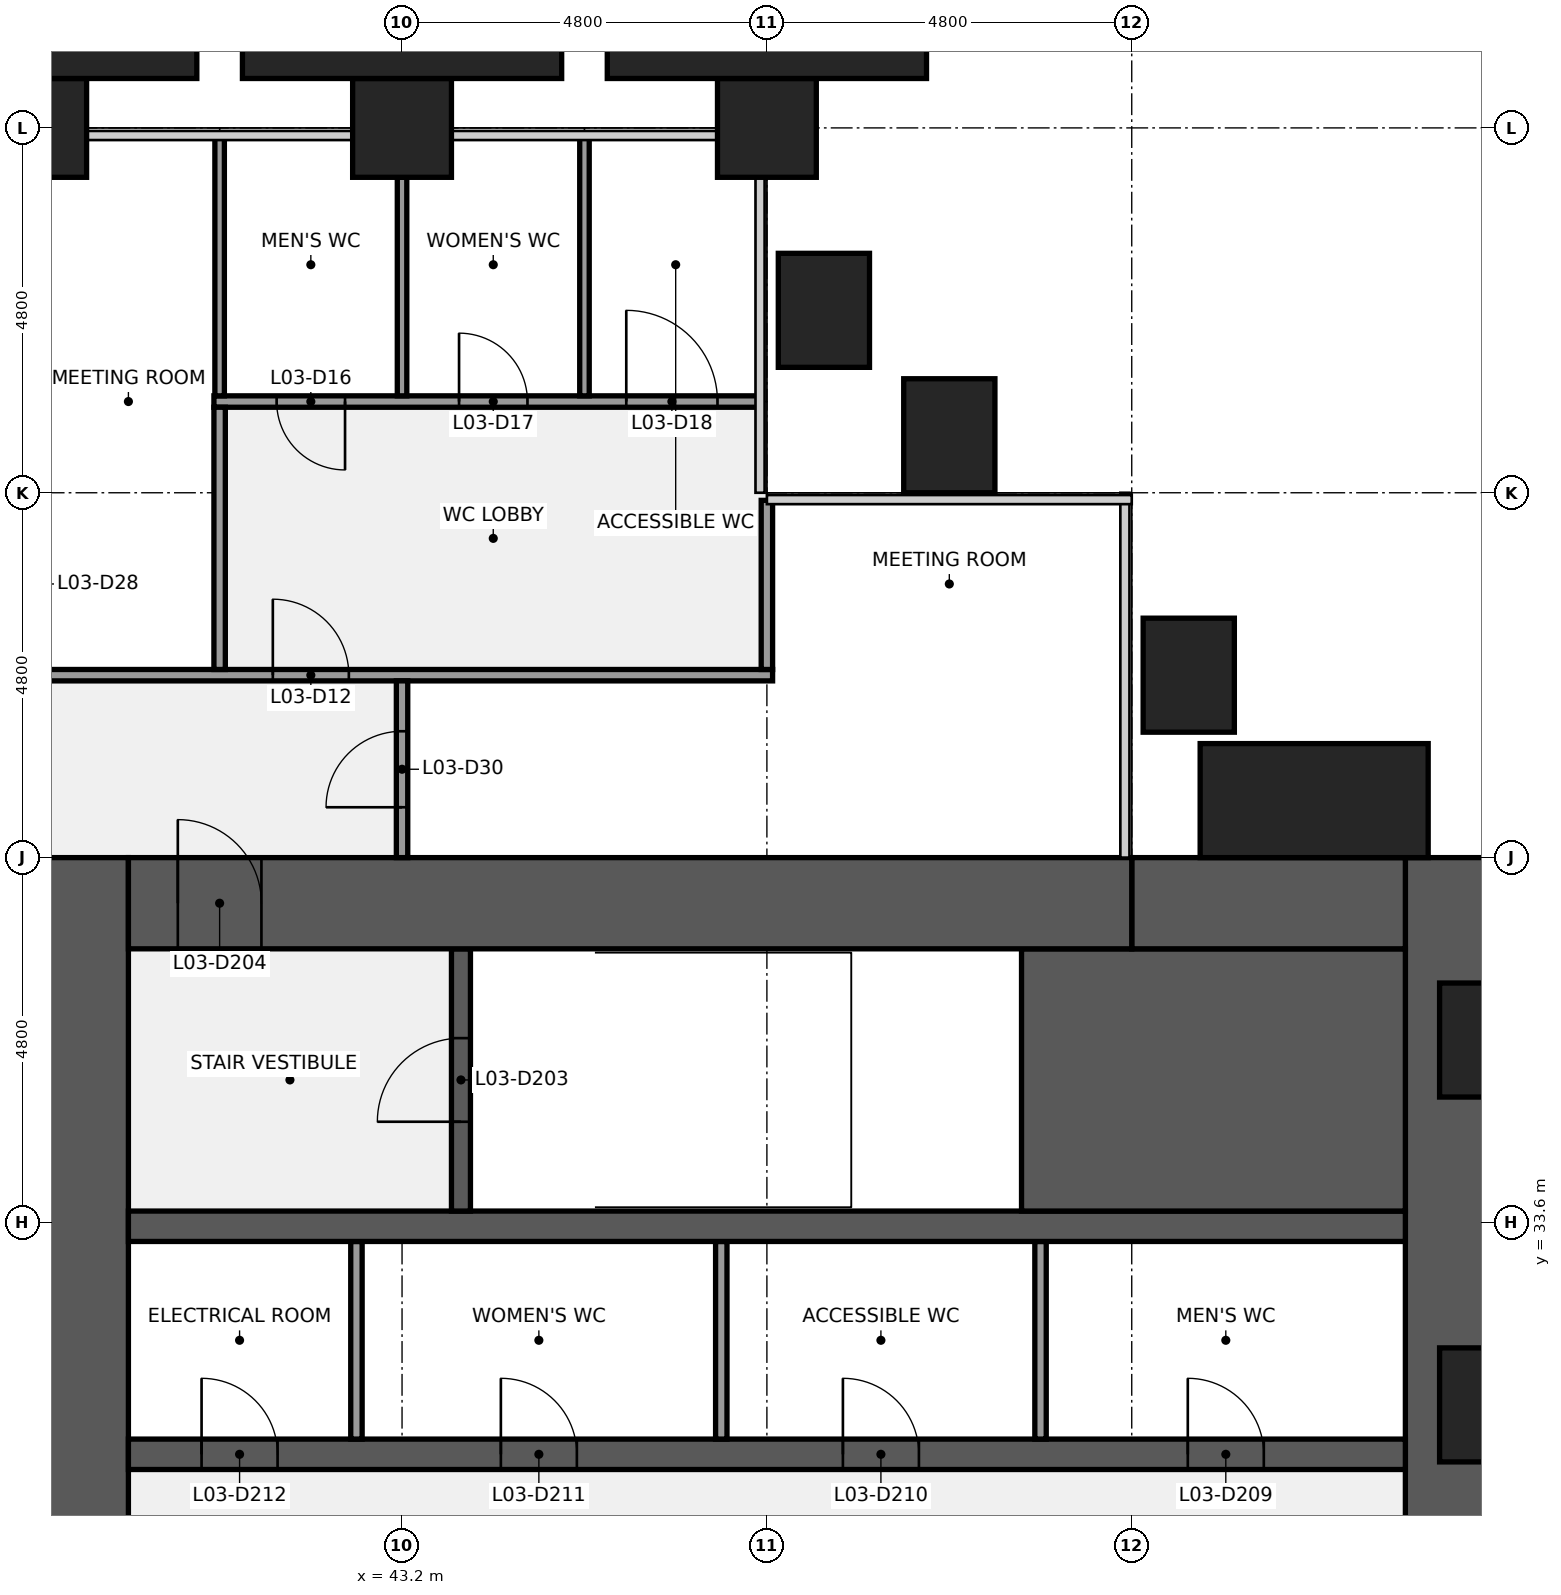
"""IFC4 building model, lengths in metres.
Left out: names, types, materials, properties, quantities, classifications, styles, units other than length and angle.
Written with IfcOpenShell. Run it as: python <this file> out.ifc"""

import sys

from ifc_helpers import new_model, si_unit, direction, frame, frame_2d, origin, origin_2d, place, context, subcontext, project, spatial, rectangle, extrude, element, fill, save


model = new_model("IFC4")
c1 = context("Model", 3, precision=1e-05, world=origin(), true_north=direction((0.0, 1.0)))
c2 = subcontext(c1, "Body", "Model", "MODEL_VIEW")
j1 = project(units=[si_unit("LENGTHUNIT", "METRE"), si_unit("PLANEANGLEUNIT", "RADIAN")], contexts=[c1])
p1 = place(None, origin())
s1 = spatial("IfcSite", under=j1, at=p1, CompositionType="ELEMENT")
p2 = place(p1, origin())
s2 = spatial("IfcBuilding", under=s1, at=p2, CompositionType="ELEMENT")
p3 = place(p2, frame((0.0, 0.0, 21.4)))
s3 = spatial("IfcBuildingStorey", under=s2, at=p3, CompositionType="ELEMENT", Elevation=21.4)
for number, where, z_axis, x_axis in (
    (1, (38.4, 48.0, 0.0), (0.0, 0.0, 1.0), (1.0, 0.0, 0.0)),
    (2, (43.2, 48.0, 0.0), (0.0, 0.0, 1.0), (1.0, 0.0, 0.0)),
    (3, (48.0, 48.0, 0.0), (0.0, 0.0, 1.0), (1.0, 0.0, 0.0)),
):
    element("IfcColumn", number, at=place(p3, frame(where, z_axis=z_axis, x_axis=x_axis)), inside=s3, PredefinedType="COLUMN", context=c2, shape_type="SweptSolid", body=[
        extrude(rectangle(XDim=1.3, YDim=1.3, at=origin_2d()), origin(), (0.0, 0.0, 1.0), 4.4),
    ])
p4 = place(p3, frame((57.0, 38.4, 0.0), z_axis=(0.0, 0.0, 1.0), x_axis=(0.0, -1.0, 0.0)))
e4 = element("IfcWall", 4, at=p4, inside=s3, PredefinedType="SHEAR", context=c2, shape_type="SweptSolid", body=[
    extrude(rectangle(XDim=28.8, YDim=1.2, at=frame_2d((14.4, 0.0))), origin(), (0.0, 0.0, 1.0), 4.24),
])
p5 = place(p4, frame((18.45, 0.0, 0.9)))
e5 = element("IfcOpeningElement", 5, at=p5, cuts=e4, PredefinedType="OPENING", context=c2, shape_type="SweptSolid", body=[
    extrude(rectangle(XDim=1.5, YDim=1.5, at=frame_2d((0.75, 0.75))), frame((0.0, 0.61, 0.0), z_axis=(0.0, -1.0, 0.0), x_axis=(1.0, 0.0, 0.0)), (0.0, 0.0, 1.0), 1.22),
])
p6 = place(p4, frame((8.85, 0.0, 0.9)))
e6 = element("IfcOpeningElement", 6, at=p6, cuts=e4, PredefinedType="OPENING", context=c2, shape_type="SweptSolid", body=[
    extrude(rectangle(XDim=1.5, YDim=1.5, at=frame_2d((0.75, 0.75))), frame((0.0, 0.61, 0.0), z_axis=(0.0, -1.0, 0.0), x_axis=(1.0, 0.0, 0.0)), (0.0, 0.0, 1.0), 1.22),
])
p7 = place(p3, frame((39.0, 9.6, 0.0), z_axis=(0.0, 0.0, 1.0), x_axis=(0.0, 1.0, 0.0)))
e7 = element("IfcWall", 7, at=p7, inside=s3, PredefinedType="SHEAR", context=c2, shape_type="SweptSolid", body=[
    extrude(rectangle(XDim=28.8, YDim=1.2, at=frame_2d((14.4, 0.0))), origin(), (0.0, 0.0, 1.0), 4.24),
])
p8 = place(p7, frame((8.7, 0.0, 0.0)))
e8 = element("IfcOpeningElement", 8, at=p8, cuts=e7, PredefinedType="OPENING", context=c2, shape_type="SweptSolid", body=[
    extrude(rectangle(XDim=1.8, YDim=2.1, at=frame_2d((0.9, 1.05))), frame((0.0, 0.61, 0.0), z_axis=(0.0, -1.0, 0.0), x_axis=(1.0, 0.0, 0.0)), (0.0, 0.0, 1.0), 1.22),
])
p9 = place(p7, frame((18.3, 0.0, 0.0)))
e9 = element("IfcOpeningElement", 9, at=p9, cuts=e7, PredefinedType="OPENING", context=c2, shape_type="SweptSolid", body=[
    extrude(rectangle(XDim=1.8, YDim=2.1, at=frame_2d((0.9, 1.05))), frame((0.0, 0.61, 0.0), z_axis=(0.0, -1.0, 0.0), x_axis=(1.0, 0.0, 0.0)), (0.0, 0.0, 1.0), 1.22),
])
p10 = place(p3, frame((39.6, 30.55, 0.0), z_axis=(0.0, 0.0, 1.0), x_axis=(1.0, 0.0, 0.0)))
e10 = element("IfcWall", 10, at=p10, inside=s3, PredefinedType="SHEAR", context=c2, shape_type="SweptSolid", body=[
    extrude(rectangle(XDim=16.8, YDim=0.4, at=frame_2d((8.4, 0.0))), origin(), (0.0, 0.0, 1.0), 4.24),
])
p11 = place(p10, frame((13.938, 0.0, 0.0)))
e11 = element("IfcOpeningElement", 11, at=p11, cuts=e10, PredefinedType="OPENING", context=c2, shape_type="SweptSolid", body=[
    extrude(rectangle(XDim=1.0, YDim=2.1, at=frame_2d((0.5, 1.05))), frame((0.0, 0.21, 0.0), z_axis=(0.0, -1.0, 0.0), x_axis=(1.0, 0.0, 0.0)), (0.0, 0.0, 1.0), 0.42),
])
p12 = place(p10, frame((9.4, 0.0, 0.0)))
e12 = element("IfcOpeningElement", 12, at=p12, cuts=e10, PredefinedType="OPENING", context=c2, shape_type="SweptSolid", body=[
    extrude(rectangle(XDim=1.0, YDim=2.1, at=frame_2d((0.5, 1.05))), frame((0.0, 0.21, 0.0), z_axis=(0.0, -1.0, 0.0), x_axis=(1.0, 0.0, 0.0)), (0.0, 0.0, 1.0), 0.42),
])
p13 = place(p10, frame((4.9, 0.0, 0.0)))
e13 = element("IfcOpeningElement", 13, at=p13, cuts=e10, PredefinedType="OPENING", context=c2, shape_type="SweptSolid", body=[
    extrude(rectangle(XDim=1.0, YDim=2.1, at=frame_2d((0.5, 1.05))), frame((0.0, 0.21, 0.0), z_axis=(0.0, -1.0, 0.0), x_axis=(1.0, 0.0, 0.0)), (0.0, 0.0, 1.0), 0.42),
])
p14 = place(p10, frame((0.962, 0.0, 0.0)))
e14 = element("IfcOpeningElement", 14, at=p14, cuts=e10, PredefinedType="OPENING", context=c2, shape_type="SweptSolid", body=[
    extrude(rectangle(XDim=1.0, YDim=2.1, at=frame_2d((0.5, 1.05))), frame((0.0, 0.21, 0.0), z_axis=(0.0, -1.0, 0.0), x_axis=(1.0, 0.0, 0.0)), (0.0, 0.0, 1.0), 0.42),
])
for number, where, z_axis, x_axis in (
    (15, (51.6, 30.75, 0.0), (0.0, 0.0, 1.0), (0.0, 1.0, 0.0)),
    (16, (47.4, 30.75, 0.0), (0.0, 0.0, 1.0), (0.0, 1.0, 0.0)),
    (17, (42.6, 30.75, 0.0), (0.0, 0.0, 1.0), (0.0, 1.0, 0.0)),
):
    element("IfcWall", number, at=place(p3, frame(where, z_axis=z_axis, x_axis=x_axis)), inside=s3, PredefinedType="PARTITIONING", context=c2, shape_type="SweptSolid", body=[
        extrude(rectangle(XDim=2.6, YDim=0.15, at=frame_2d((1.3, 0.0))), origin(), (0.0, 0.0, 1.0), 4.24),
    ])
p15 = place(p3, frame((39.6, 33.55, 0.0), z_axis=(0.0, 0.0, 1.0), x_axis=(1.0, 0.0, 0.0)))
e18 = element("IfcWall", 18, at=p15, inside=s3, PredefinedType="SHEAR", context=c2, shape_type="SweptSolid", body=[
    extrude(rectangle(XDim=16.8, YDim=0.4, at=frame_2d((8.4, 0.0))), origin(), (0.0, 0.0, 1.0), 4.24),
])
p16 = place(p3, frame((51.35, 35.475, 0.0), z_axis=(0.0, 0.0, 1.0), x_axis=(1.0, 0.0, 0.0)))
e19 = element("IfcWall", 19, at=p16, inside=s3, PredefinedType="SHEAR", context=c2, shape_type="SweptSolid", body=[
    extrude(rectangle(XDim=5.05, YDim=3.45, at=frame_2d((2.525, 0.0))), origin(), (0.0, 0.0, 1.0), 4.24),
])
p17 = place(p3, frame((43.975, 33.75, 0.0), z_axis=(0.0, 0.0, 1.0), x_axis=(0.0, 1.0, 0.0)))
e20 = element("IfcWall", 20, at=p17, inside=s3, PredefinedType="SHEAR", context=c2, shape_type="SweptSolid", body=[
    extrude(rectangle(XDim=3.45, YDim=0.25, at=frame_2d((1.725, 0.0))), origin(), (0.0, 0.0, 1.0), 4.24),
])
p18 = place(p17, frame((1.175, 0.0, 0.0)))
e21 = element("IfcOpeningElement", 21, at=p18, cuts=e20, PredefinedType="OPENING", context=c2, shape_type="SweptSolid", body=[
    extrude(rectangle(XDim=1.1, YDim=2.1, at=frame_2d((0.55, 1.05))), frame((0.0, 0.135, 0.0), z_axis=(0.0, -1.0, 0.0), x_axis=(1.0, 0.0, 0.0)), (0.0, 0.0, 1.0), 0.27),
])
p19 = place(p3, frame((52.8, 37.8, 0.0), z_axis=(0.0, 0.0, 1.0), x_axis=(1.0, 0.0, 0.0)))
e22 = element("IfcWall", 22, at=p19, inside=s3, PredefinedType="SHEAR", context=c2, shape_type="SweptSolid", body=[
    extrude(rectangle(XDim=3.6, YDim=1.2, at=frame_2d((1.8, 0.0))), origin(), (0.0, 0.0, 1.0), 4.24),
])
p20 = place(p3, frame((39.6, 37.8, 0.0), z_axis=(0.0, 0.0, 1.0), x_axis=(1.0, 0.0, 0.0)))
e23 = element("IfcWall", 23, at=p20, inside=s3, PredefinedType="SHEAR", context=c2, shape_type="SweptSolid", body=[
    extrude(rectangle(XDim=13.2, YDim=1.2, at=frame_2d((6.6, 0.0))), origin(), (0.0, 0.0, 1.0), 4.24),
])
p21 = place(p20, frame((0.65, 0.0, 0.0)))
e24 = element("IfcOpeningElement", 24, at=p21, cuts=e23, PredefinedType="OPENING", context=c2, shape_type="SweptSolid", body=[
    extrude(rectangle(XDim=1.1, YDim=2.1, at=frame_2d((0.55, 1.05))), frame((0.0, 0.61, 0.0), z_axis=(0.0, -1.0, 0.0), x_axis=(1.0, 0.0, 0.0)), (0.0, 0.0, 1.0), 1.22),
])
p22 = place(p3, frame((38.325, 40.8, 0.0), z_axis=(0.0, 0.0, 1.0), x_axis=(1.0, 0.0, 0.0)))
e25 = element("IfcWall", 25, at=p22, inside=s3, PredefinedType="PARTITIONING", context=c2, shape_type="SweptSolid", body=[
    extrude(rectangle(XDim=9.75, YDim=0.15, at=frame_2d((4.875, 0.0))), origin(), (0.0, 0.0, 1.0), 3.27),
])
p23 = place(p22, frame((3.175, 0.0, 0.0)))
e26 = element("IfcOpeningElement", 26, at=p23, cuts=e25, PredefinedType="OPENING", context=c2, shape_type="SweptSolid", body=[
    extrude(rectangle(XDim=1.0, YDim=2.1, at=frame_2d((0.5, 1.05))), frame((0.0, 0.085, 0.0), z_axis=(0.0, -1.0, 0.0), x_axis=(1.0, 0.0, 0.0)), (0.0, 0.0, 1.0), 0.17),
])
p24 = place(p3, frame((40.725, 44.4, 0.0), z_axis=(0.0, 0.0, 1.0), x_axis=(1.0, 0.0, 0.0)))
e27 = element("IfcWall", 27, at=p24, inside=s3, PredefinedType="PARTITIONING", context=c2, shape_type="SweptSolid", body=[
    extrude(rectangle(XDim=7.175, YDim=0.15, at=frame_2d((3.587, 0.0))), origin(), (0.0, 0.0, 1.0), 3.27),
])
p25 = place(p24, frame((0.825, 0.0, 0.0)))
e28 = element("IfcOpeningElement", 28, at=p25, cuts=e27, PredefinedType="OPENING", context=c2, shape_type="SweptSolid", body=[
    extrude(rectangle(XDim=0.9, YDim=2.1, at=frame_2d((0.45, 1.05))), frame((0.0, 0.085, 0.0), z_axis=(0.0, -1.0, 0.0), x_axis=(1.0, 0.0, 0.0)), (0.0, 0.0, 1.0), 0.17),
])
p26 = place(p24, frame((3.225, 0.0, 0.0)))
e29 = element("IfcOpeningElement", 29, at=p26, cuts=e27, PredefinedType="OPENING", context=c2, shape_type="SweptSolid", body=[
    extrude(rectangle(XDim=0.9, YDim=2.1, at=frame_2d((0.45, 1.05))), frame((0.0, 0.085, 0.0), z_axis=(0.0, -1.0, 0.0), x_axis=(1.0, 0.0, 0.0)), (0.0, 0.0, 1.0), 0.17),
])
p27 = place(p24, frame((5.425, 0.0, 0.0)))
e30 = element("IfcOpeningElement", 30, at=p27, cuts=e27, PredefinedType="OPENING", context=c2, shape_type="SweptSolid", body=[
    extrude(rectangle(XDim=1.2, YDim=2.1, at=frame_2d((0.6, 1.05))), frame((0.0, 0.085, 0.0), z_axis=(0.0, -1.0, 0.0), x_axis=(1.0, 0.0, 0.0)), (0.0, 0.0, 1.0), 0.17),
])
p28 = place(p3, frame((40.8, 44.475, 0.0), z_axis=(0.0, 0.0, 1.0), x_axis=(0.0, 1.0, 0.0)))
e31 = element("IfcWall", 31, at=p28, inside=s3, PredefinedType="PARTITIONING", context=c2, shape_type="SweptSolid", body=[
    extrude(rectangle(XDim=3.425, YDim=0.125, at=frame_2d((1.712, 0.0))), origin(), (0.0, 0.0, 1.0), 3.27),
])
p29 = place(p3, frame((40.8, 40.875, 0.0), z_axis=(0.0, 0.0, 1.0), x_axis=(0.0, 1.0, 0.0)))
e32 = element("IfcWall", 32, at=p29, inside=s3, PredefinedType="PARTITIONING", context=c2, shape_type="SweptSolid", body=[
    extrude(rectangle(XDim=3.45, YDim=0.15, at=frame_2d((1.725, 0.0))), origin(), (0.0, 0.0, 1.0), 3.27),
])
p30 = place(p3, frame((43.2, 44.475, 0.0), z_axis=(0.0, 0.0, 1.0), x_axis=(0.0, 1.0, 0.0)))
e33 = element("IfcWall", 33, at=p30, inside=s3, PredefinedType="PARTITIONING", context=c2, shape_type="SweptSolid", body=[
    extrude(rectangle(XDim=2.875, YDim=0.125, at=frame_2d((1.438, 0.0))), origin(), (0.0, 0.0, 1.0), 3.27),
])
p31 = place(p3, frame((43.2, 38.4, 0.0), z_axis=(0.0, 0.0, 1.0), x_axis=(0.0, 1.0, 0.0)))
e34 = element("IfcWall", 34, at=p31, inside=s3, PredefinedType="PARTITIONING", context=c2, shape_type="SweptSolid", body=[
    extrude(rectangle(XDim=2.325, YDim=0.15, at=frame_2d((1.163, 0.0))), origin(), (0.0, 0.0, 1.0), 3.27),
])
p32 = place(p31, frame((0.663, 0.0, 0.0)))
e35 = element("IfcOpeningElement", 35, at=p32, cuts=e34, PredefinedType="OPENING", context=c2, shape_type="SweptSolid", body=[
    extrude(rectangle(XDim=1.0, YDim=2.1, at=frame_2d((0.5, 1.05))), frame((0.0, 0.085, 0.0), z_axis=(0.0, -1.0, 0.0), x_axis=(1.0, 0.0, 0.0)), (0.0, 0.0, 1.0), 0.17),
])
p33 = place(p3, frame((45.6, 44.475, 0.0), z_axis=(0.0, 0.0, 1.0), x_axis=(0.0, 1.0, 0.0)))
e36 = element("IfcWall", 36, at=p33, inside=s3, PredefinedType="PARTITIONING", context=c2, shape_type="SweptSolid", body=[
    extrude(rectangle(XDim=3.425, YDim=0.125, at=frame_2d((1.712, 0.0))), origin(), (0.0, 0.0, 1.0), 3.27),
])
p34 = place(p3, frame((48.0, 40.875, 0.0), z_axis=(0.0, 0.0, 1.0), x_axis=(0.0, 1.0, 0.0)))
e37 = element("IfcWall", 37, at=p34, inside=s3, PredefinedType="PARTITIONING", context=c2, shape_type="SweptSolid", body=[
    extrude(rectangle(XDim=2.225, YDim=0.15, at=frame_2d((1.113, 0.0))), origin(), (0.0, 0.0, 1.0), 3.27),
])
for number, where, z_axis, x_axis in (
    (38, (53.55, 40.8, 0.0), (0.0, 0.0, 1.0), (0.0, 1.0, 0.0)),
    (39, (50.4, 43.95, 0.0), (0.0, 0.0, 1.0), (1.0, 0.0, 0.0)),
    (40, (48.75, 45.6, 0.0), (0.0, 0.0, 1.0), (0.0, 1.0, 0.0)),
):
    element("IfcColumn", number, at=place(p3, frame(where, z_axis=z_axis, x_axis=x_axis)), inside=s3, PredefinedType="PILASTER", context=c2, shape_type="SweptSolid", body=[
        extrude(rectangle(XDim=1.2, YDim=1.5, at=origin_2d()), origin(), (0.0, 0.0, 1.0), 4.4),
    ])
p35 = place(p3, frame((55.2, 39.15, 0.0), z_axis=(0.0, 0.0, 1.0), x_axis=(1.0, 0.0, 0.0)))
e41 = element("IfcColumn", 41, at=p35, inside=s3, PredefinedType="PILASTER", context=c2, shape_type="SweptSolid", body=[
    extrude(rectangle(XDim=3.0, YDim=1.5, at=origin_2d()), origin(), (0.0, 0.0, 1.0), 4.4),
])
for number, where, z_axis, x_axis in (
    (42, (38.4, 49.075, 0.0), (0.0, 0.0, 1.0), (1.0, 0.0, 0.0)),
    (43, (43.2, 49.075, 0.0), (0.0, 0.0, 1.0), (1.0, 0.0, 0.0)),
    (44, (48.0, 49.075, 0.0), (0.0, 0.0, 1.0), (1.0, 0.0, 0.0)),
):
    element("IfcColumn", number, at=place(p3, frame(where, z_axis=z_axis, x_axis=x_axis)), inside=s3, PredefinedType="PILASTER", context=c2, shape_type="SweptSolid", body=[
        extrude(rectangle(XDim=4.2, YDim=0.85, at=origin_2d()), origin(), (0.0, 0.0, 1.0), 4.4),
    ])
p36 = place(p18, origin())
e45 = element("IfcDoor", 45, at=p36, inside=s3, OperationType="SINGLE_SWING_LEFT", PredefinedType="DOOR", context=c2, shape_type="SweptSolid", body=[
    extrude(rectangle(XDim=1.1, YDim=2.1, at=frame_2d((0.55, 1.05))), frame((0.0, 0.025, 0.0), z_axis=(0.0, -1.0, 0.0), x_axis=(1.0, 0.0, 0.0)), (0.0, 0.0, 1.0), 0.05),
])
fill(e21, e45)
p37 = place(p21, origin())
e46 = element("IfcDoor", 46, at=p37, inside=s3, OperationType="SINGLE_SWING_LEFT", PredefinedType="DOOR", context=c2, shape_type="SweptSolid", body=[
    extrude(rectangle(XDim=1.1, YDim=2.1, at=frame_2d((0.55, 1.05))), frame((0.0, 0.025, 0.0), z_axis=(0.0, -1.0, 0.0), x_axis=(1.0, 0.0, 0.0)), (0.0, 0.0, 1.0), 0.05),
])
fill(e24, e46)
p38 = place(p11, origin())
e47 = element("IfcDoor", 47, at=p38, inside=s3, OperationType="SINGLE_SWING_LEFT", PredefinedType="DOOR", context=c2, shape_type="SweptSolid", body=[
    extrude(rectangle(XDim=1.0, YDim=2.1, at=frame_2d((0.5, 1.05))), frame((0.0, 0.025, 0.0), z_axis=(0.0, -1.0, 0.0), x_axis=(1.0, 0.0, 0.0)), (0.0, 0.0, 1.0), 0.05),
])
fill(e11, e47)
p39 = place(p12, origin())
e48 = element("IfcDoor", 48, at=p39, inside=s3, OperationType="SINGLE_SWING_LEFT", PredefinedType="DOOR", context=c2, shape_type="SweptSolid", body=[
    extrude(rectangle(XDim=1.0, YDim=2.1, at=frame_2d((0.5, 1.05))), frame((0.0, 0.025, 0.0), z_axis=(0.0, -1.0, 0.0), x_axis=(1.0, 0.0, 0.0)), (0.0, 0.0, 1.0), 0.05),
])
fill(e12, e48)
p40 = place(p13, origin())
e49 = element("IfcDoor", 49, at=p40, inside=s3, OperationType="SINGLE_SWING_LEFT", PredefinedType="DOOR", context=c2, shape_type="SweptSolid", body=[
    extrude(rectangle(XDim=1.0, YDim=2.1, at=frame_2d((0.5, 1.05))), frame((0.0, 0.025, 0.0), z_axis=(0.0, -1.0, 0.0), x_axis=(1.0, 0.0, 0.0)), (0.0, 0.0, 1.0), 0.05),
])
fill(e13, e49)
p41 = place(p14, origin())
e50 = element("IfcDoor", 50, at=p41, inside=s3, OperationType="SINGLE_SWING_LEFT", PredefinedType="DOOR", context=c2, shape_type="SweptSolid", body=[
    extrude(rectangle(XDim=1.0, YDim=2.1, at=frame_2d((0.5, 1.05))), frame((0.0, 0.025, 0.0), z_axis=(0.0, -1.0, 0.0), x_axis=(1.0, 0.0, 0.0)), (0.0, 0.0, 1.0), 0.05),
])
fill(e14, e50)
p42 = place(p23, origin())
e51 = element("IfcDoor", 51, at=p42, inside=s3, OperationType="SINGLE_SWING_LEFT", PredefinedType="DOOR", context=c2, shape_type="SweptSolid", body=[
    extrude(rectangle(XDim=1.0, YDim=2.1, at=frame_2d((0.5, 1.05))), frame((0.0, 0.025, 0.0), z_axis=(0.0, -1.0, 0.0), x_axis=(1.0, 0.0, 0.0)), (0.0, 0.0, 1.0), 0.05),
])
fill(e26, e51)
p43 = place(p25, origin())
e52 = element("IfcDoor", 52, at=p43, inside=s3, OperationType="SINGLE_SWING_RIGHT", PredefinedType="DOOR", context=c2, shape_type="SweptSolid", body=[
    extrude(rectangle(XDim=0.9, YDim=2.1, at=frame_2d((0.45, 1.05))), frame((0.0, 0.025, 0.0), z_axis=(0.0, -1.0, 0.0), x_axis=(1.0, 0.0, 0.0)), (0.0, 0.0, 1.0), 0.05),
])
fill(e28, e52)
p44 = place(p26, origin())
e53 = element("IfcDoor", 53, at=p44, inside=s3, OperationType="SINGLE_SWING_LEFT", PredefinedType="DOOR", context=c2, shape_type="SweptSolid", body=[
    extrude(rectangle(XDim=0.9, YDim=2.1, at=frame_2d((0.45, 1.05))), frame((0.0, 0.025, 0.0), z_axis=(0.0, -1.0, 0.0), x_axis=(1.0, 0.0, 0.0)), (0.0, 0.0, 1.0), 0.05),
])
fill(e29, e53)
p45 = place(p27, origin())
e54 = element("IfcDoor", 54, at=p45, inside=s3, OperationType="SINGLE_SWING_LEFT", PredefinedType="DOOR", context=c2, shape_type="SweptSolid", body=[
    extrude(rectangle(XDim=1.2, YDim=2.1, at=frame_2d((0.6, 1.05))), frame((0.0, 0.025, 0.0), z_axis=(0.0, -1.0, 0.0), x_axis=(1.0, 0.0, 0.0)), (0.0, 0.0, 1.0), 0.05),
])
fill(e30, e54)
p46 = place(p32, origin())
e55 = element("IfcDoor", 55, at=p46, inside=s3, OperationType="SINGLE_SWING_LEFT", PredefinedType="DOOR", context=c2, shape_type="SweptSolid", body=[
    extrude(rectangle(XDim=1.0, YDim=2.1, at=frame_2d((0.5, 1.05))), frame((0.0, 0.025, 0.0), z_axis=(0.0, -1.0, 0.0), x_axis=(1.0, 0.0, 0.0)), (0.0, 0.0, 1.0), 0.05),
])
fill(e35, e55)
save(model, sys.argv[1])
